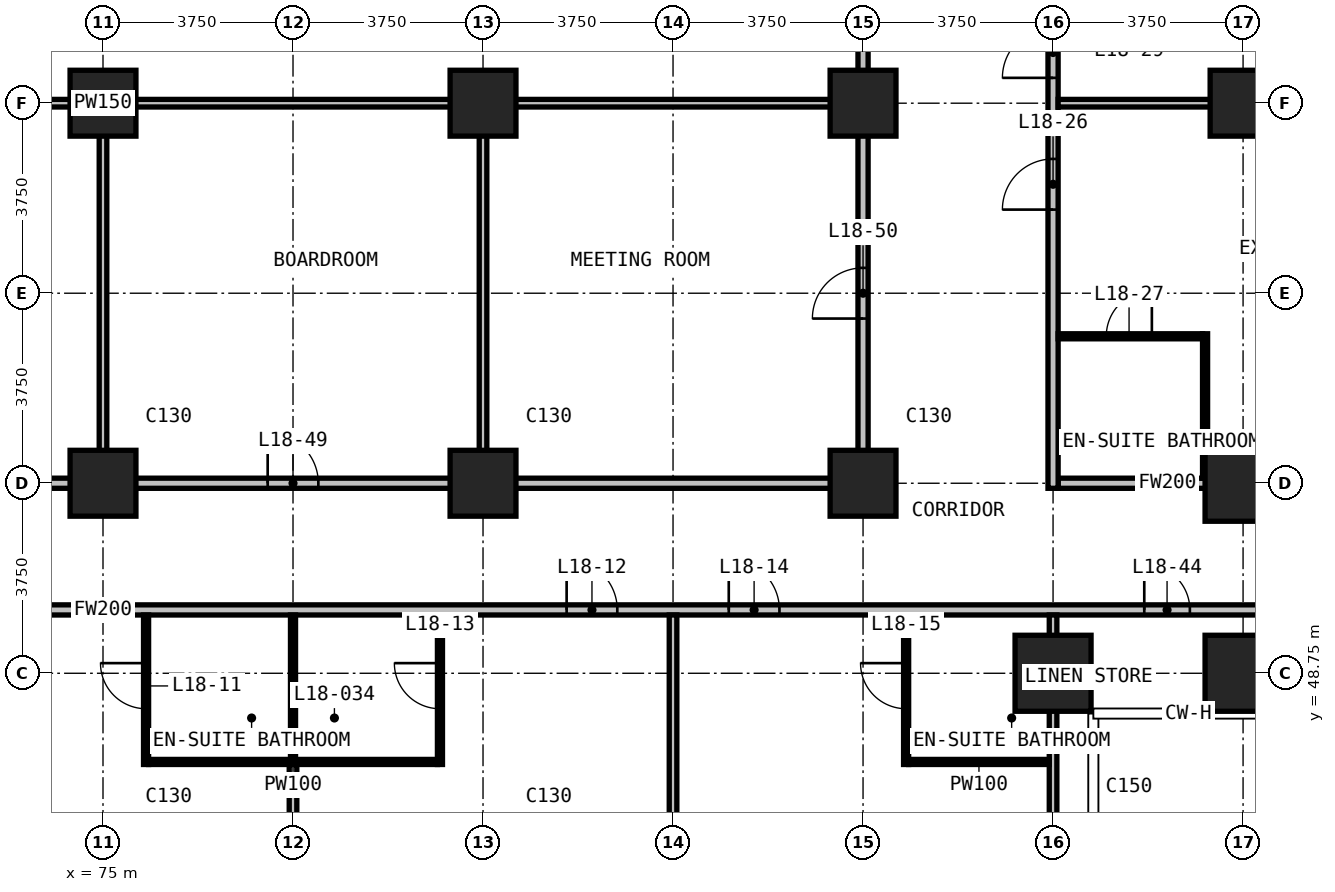
"""IFC4 building model, lengths in metres.
Left out: names, types, materials, properties, quantities, classifications, styles, units other than length and angle.
Written with IfcOpenShell. Run it as: python <this file> out.ifc"""

import sys

from ifc_helpers import new_model, si_unit, direction, frame, frame_2d, origin, origin_2d, place, context, subcontext, project, spatial, rectangle, extrude, element, fill, save


model = new_model("IFC4")
c1 = context("Model", 3, precision=1e-05, world=origin(), true_north=direction((0.0, 1.0)))
c2 = subcontext(c1, "Body", "Model", "MODEL_VIEW")
j1 = project(units=[si_unit("LENGTHUNIT", "METRE"), si_unit("PLANEANGLEUNIT", "RADIAN")], contexts=[c1])
p1 = place(None, origin())
s1 = spatial("IfcSite", under=j1, at=p1, CompositionType="ELEMENT")
p2 = place(p1, origin())
s2 = spatial("IfcBuilding", under=s1, at=p2, CompositionType="ELEMENT")
p3 = place(p2, frame((0.0, 0.0, 79.1)))
s3 = spatial("IfcBuildingStorey", under=s2, at=p3, CompositionType="ELEMENT", Elevation=79.1)
for number, where, z_axis, x_axis in (
    (1, (75.0, 52.5, 0.0), (0.0, 0.0, 1.0), (1.0, 0.0, 0.0)),
    (2, (75.0, 60.0, 0.0), (0.0, 0.0, 1.0), (1.0, 0.0, 0.0)),
    (3, (82.5, 52.5, 0.0), (0.0, 0.0, 1.0), (1.0, 0.0, 0.0)),
    (4, (82.5, 60.0, 0.0), (0.0, 0.0, 1.0), (1.0, 0.0, 0.0)),
    (5, (90.0, 52.5, 0.0), (0.0, 0.0, 1.0), (1.0, 0.0, 0.0)),
    (6, (90.0, 60.0, 0.0), (0.0, 0.0, 1.0), (1.0, 0.0, 0.0)),
):
    element("IfcColumn", number, at=place(p3, frame(where, z_axis=z_axis, x_axis=x_axis)), inside=s3, PredefinedType="COLUMN", context=c2, shape_type="SweptSolid", body=[
        extrude(rectangle(XDim=1.3, YDim=1.3, at=origin_2d()), origin(), (0.0, 0.0, 1.0), 3.3),
    ])
for number, where, z_axis, x_axis in (
    (7, (93.75, 48.75, 0.0), (0.0, 0.0, 1.0), (1.0, 0.0, 0.0)),
    (8, (97.5, 48.75, 0.0), (0.0, 0.0, 1.0), (1.0, 0.0, 0.0)),
    (9, (97.5, 52.5, 0.0), (0.0, 0.0, 1.0), (1.0, 0.0, 0.0)),
):
    element("IfcColumn", number, at=place(p3, frame(where, z_axis=z_axis, x_axis=x_axis)), inside=s3, PredefinedType="COLUMN", context=c2, shape_type="SweptSolid", body=[
        extrude(rectangle(XDim=1.5, YDim=1.5, at=origin_2d()), origin(), (0.0, 0.0, 1.0), 3.3),
    ])
p4 = place(p3, frame((97.5, 60.0, 0.0), z_axis=(0.0, 0.0, 1.0), x_axis=(1.0, 0.0, 0.0)))
e10 = element("IfcColumn", 10, at=p4, inside=s3, PredefinedType="COLUMN", context=c2, shape_type="SweptSolid", body=[
    extrude(rectangle(XDim=1.3, YDim=1.3, at=origin_2d()), origin(), (0.0, 0.0, 1.0), 3.3),
])
p5 = place(p3, frame((51.735, 50.0, 0.0), z_axis=(0.0, 0.0, 1.0), x_axis=(1.0, 0.0, 0.0)))
e11 = element("IfcWall", 11, at=p5, inside=s3, PredefinedType="PARTITIONING", context=c2, shape_type="SweptSolid", body=[
    extrude(rectangle(XDim=46.53, YDim=0.2, at=frame_2d((23.265, 0.0))), origin(), (0.0, 0.0, 1.0), 3.0),
])
p6 = place(p5, frame((5.615, 0.0, 0.0)))
e12 = element("IfcOpeningElement", 12, at=p6, cuts=e11, PredefinedType="OPENING", context=c2, shape_type="SweptSolid", body=[
    extrude(rectangle(XDim=1.0, YDim=2.2, at=frame_2d((0.5, 1.1))), frame((0.0, 0.11, 0.0), z_axis=(0.0, -1.0, 0.0), x_axis=(1.0, 0.0, 0.0)), (0.0, 0.0, 1.0), 0.22),
])
p7 = place(p5, frame((17.415, 0.0, 0.0)))
e13 = element("IfcOpeningElement", 13, at=p7, cuts=e11, PredefinedType="OPENING", context=c2, shape_type="SweptSolid", body=[
    extrude(rectangle(XDim=1.0, YDim=2.2, at=frame_2d((0.5, 1.1))), frame((0.0, 0.11, 0.0), z_axis=(0.0, -1.0, 0.0), x_axis=(1.0, 0.0, 0.0)), (0.0, 0.0, 1.0), 0.22),
])
p8 = place(p5, frame((20.615, 0.0, 0.0)))
e14 = element("IfcOpeningElement", 14, at=p8, cuts=e11, PredefinedType="OPENING", context=c2, shape_type="SweptSolid", body=[
    extrude(rectangle(XDim=1.0, YDim=2.2, at=frame_2d((0.5, 1.1))), frame((0.0, 0.11, 0.0), z_axis=(0.0, -1.0, 0.0), x_axis=(1.0, 0.0, 0.0)), (0.0, 0.0, 1.0), 0.22),
])
p9 = place(p5, frame((32.415, 0.0, 0.0)))
e15 = element("IfcOpeningElement", 15, at=p9, cuts=e11, PredefinedType="OPENING", context=c2, shape_type="SweptSolid", body=[
    extrude(rectangle(XDim=1.0, YDim=2.2, at=frame_2d((0.5, 1.1))), frame((0.0, 0.11, 0.0), z_axis=(0.0, -1.0, 0.0), x_axis=(1.0, 0.0, 0.0)), (0.0, 0.0, 1.0), 0.22),
])
p10 = place(p5, frame((35.615, 0.0, 0.0)))
e16 = element("IfcOpeningElement", 16, at=p10, cuts=e11, PredefinedType="OPENING", context=c2, shape_type="SweptSolid", body=[
    extrude(rectangle(XDim=1.0, YDim=2.2, at=frame_2d((0.5, 1.1))), frame((0.0, 0.11, 0.0), z_axis=(0.0, -1.0, 0.0), x_axis=(1.0, 0.0, 0.0)), (0.0, 0.0, 1.0), 0.22),
])
p11 = place(p5, frame((1.8, 0.0, 0.0)))
e17 = element("IfcOpeningElement", 17, at=p11, cuts=e11, PredefinedType="OPENING", context=c2, shape_type="SweptSolid", body=[
    extrude(rectangle(XDim=0.9, YDim=2.2, at=frame_2d((0.45, 1.1))), frame((0.0, 0.11, 0.0), z_axis=(0.0, -1.0, 0.0), x_axis=(1.0, 0.0, 0.0)), (0.0, 0.0, 1.0), 0.22),
])
p12 = place(p5, frame((43.815, 0.0, 0.0)))
e18 = element("IfcOpeningElement", 18, at=p12, cuts=e11, PredefinedType="OPENING", context=c2, shape_type="SweptSolid", body=[
    extrude(rectangle(XDim=0.9, YDim=2.2, at=frame_2d((0.45, 1.1))), frame((0.0, 0.11, 0.0), z_axis=(0.0, -1.0, 0.0), x_axis=(1.0, 0.0, 0.0)), (0.0, 0.0, 1.0), 0.22),
])
p13 = place(p3, frame((60.1, 52.5, 0.0), z_axis=(0.0, 0.0, 1.0), x_axis=(1.0, 0.0, 0.0)))
e19 = element("IfcWall", 19, at=p13, inside=s3, PredefinedType="PARTITIONING", context=c2, shape_type="SweptSolid", body=[
    extrude(rectangle(XDim=29.8, YDim=0.2, at=frame_2d((14.9, 0.0))), origin(), (0.0, 0.0, 1.0), 3.0),
])
p14 = place(p13, frame((10.65, 0.0, 0.0)))
e20 = element("IfcOpeningElement", 20, at=p14, cuts=e19, PredefinedType="OPENING", context=c2, shape_type="SweptSolid", body=[
    extrude(rectangle(XDim=1.0, YDim=2.2, at=frame_2d((0.5, 1.1))), frame((0.0, 0.11, 0.0), z_axis=(0.0, -1.0, 0.0), x_axis=(1.0, 0.0, 0.0)), (0.0, 0.0, 1.0), 0.22),
])
p15 = place(p13, frame((18.15, 0.0, 0.0)))
e21 = element("IfcOpeningElement", 21, at=p15, cuts=e19, PredefinedType="OPENING", context=c2, shape_type="SweptSolid", body=[
    extrude(rectangle(XDim=1.0, YDim=2.2, at=frame_2d((0.5, 1.1))), frame((0.0, 0.11, 0.0), z_axis=(0.0, -1.0, 0.0), x_axis=(1.0, 0.0, 0.0)), (0.0, 0.0, 1.0), 0.22),
])
p16 = place(p3, frame((93.85, 52.5, 0.0), z_axis=(0.0, 0.0, 1.0), x_axis=(1.0, 0.0, 0.0)))
e22 = element("IfcWall", 22, at=p16, inside=s3, PredefinedType="PARTITIONING", context=c2, shape_type="SweptSolid", body=[
    extrude(rectangle(XDim=4.315, YDim=0.2, at=frame_2d((2.157, 0.0))), origin(), (0.0, 0.0, 1.0), 3.0),
])
p17 = place(p3, frame((90.0, 52.4, 0.0), z_axis=(0.0, 0.0, 1.0), x_axis=(0.0, 1.0, 0.0)))
e23 = element("IfcWall", 23, at=p17, inside=s3, PredefinedType="PARTITIONING", context=c2, shape_type="SweptSolid", body=[
    extrude(rectangle(XDim=18.84, YDim=0.2, at=frame_2d((9.42, 0.0))), origin(), (0.0, 0.0, 1.0), 3.0),
])
p18 = place(p17, frame((3.35, 0.0, 0.0)))
e24 = element("IfcOpeningElement", 24, at=p18, cuts=e23, PredefinedType="OPENING", context=c2, shape_type="SweptSolid", body=[
    extrude(rectangle(XDim=1.0, YDim=2.2, at=frame_2d((0.5, 1.1))), frame((0.0, 0.11, 0.0), z_axis=(0.0, -1.0, 0.0), x_axis=(1.0, 0.0, 0.0)), (0.0, 0.0, 1.0), 0.22),
])
p19 = place(p17, frame((12.3, 0.0, 0.0)))
e25 = element("IfcOpeningElement", 25, at=p19, cuts=e23, PredefinedType="OPENING", context=c2, shape_type="SweptSolid", body=[
    extrude(rectangle(XDim=1.8, YDim=2.2, at=frame_2d((0.9, 1.1))), frame((0.0, 0.11, 0.0), z_axis=(0.0, -1.0, 0.0), x_axis=(1.0, 0.0, 0.0)), (0.0, 0.0, 1.0), 0.22),
])
p20 = place(p3, frame((93.75, 52.4, 0.0), z_axis=(0.0, 0.0, 1.0), x_axis=(0.0, 1.0, 0.0)))
e26 = element("IfcWall", 26, at=p20, inside=s3, PredefinedType="PARTITIONING", context=c2, shape_type="SweptSolid", body=[
    extrude(rectangle(XDim=38.31, YDim=0.2, at=frame_2d((19.155, 0.0))), origin(), (0.0, 0.0, 1.0), 3.0),
])
p21 = place(p20, frame((5.5, 0.0, 0.0)))
e27 = element("IfcOpeningElement", 27, at=p21, cuts=e26, PredefinedType="OPENING", context=c2, shape_type="SweptSolid", body=[
    extrude(rectangle(XDim=1.0, YDim=2.2, at=frame_2d((0.5, 1.1))), frame((0.0, 0.11, 0.0), z_axis=(0.0, -1.0, 0.0), x_axis=(1.0, 0.0, 0.0)), (0.0, 0.0, 1.0), 0.22),
])
p22 = place(p20, frame((8.1, 0.0, 0.0)))
e28 = element("IfcOpeningElement", 28, at=p22, cuts=e26, PredefinedType="OPENING", context=c2, shape_type="SweptSolid", body=[
    extrude(rectangle(XDim=1.0, YDim=2.2, at=frame_2d((0.5, 1.1))), frame((0.0, 0.11, 0.0), z_axis=(0.0, -1.0, 0.0), x_axis=(1.0, 0.0, 0.0)), (0.0, 0.0, 1.0), 0.22),
])
p23 = place(p20, frame((13.6, 0.0, 0.0)))
e29 = element("IfcOpeningElement", 29, at=p23, cuts=e26, PredefinedType="OPENING", context=c2, shape_type="SweptSolid", body=[
    extrude(rectangle(XDim=1.0, YDim=2.2, at=frame_2d((0.5, 1.1))), frame((0.0, 0.11, 0.0), z_axis=(0.0, -1.0, 0.0), x_axis=(1.0, 0.0, 0.0)), (0.0, 0.0, 1.0), 0.22),
])
p24 = place(p20, frame((16.2, 0.0, 0.0)))
e30 = element("IfcOpeningElement", 30, at=p24, cuts=e26, PredefinedType="OPENING", context=c2, shape_type="SweptSolid", body=[
    extrude(rectangle(XDim=1.0, YDim=2.2, at=frame_2d((0.5, 1.1))), frame((0.0, 0.11, 0.0), z_axis=(0.0, -1.0, 0.0), x_axis=(1.0, 0.0, 0.0)), (0.0, 0.0, 1.0), 0.22),
])
p25 = place(p20, frame((24.85, 0.0, 0.0)))
e31 = element("IfcOpeningElement", 31, at=p25, cuts=e26, PredefinedType="OPENING", context=c2, shape_type="SweptSolid", body=[
    extrude(rectangle(XDim=1.0, YDim=2.2, at=frame_2d((0.5, 1.1))), frame((0.0, 0.11, 0.0), z_axis=(0.0, -1.0, 0.0), x_axis=(1.0, 0.0, 0.0)), (0.0, 0.0, 1.0), 0.22),
])
p26 = place(p20, frame((26.85, 0.0, 0.0)))
e32 = element("IfcOpeningElement", 32, at=p26, cuts=e26, PredefinedType="OPENING", context=c2, shape_type="SweptSolid", body=[
    extrude(rectangle(XDim=1.0, YDim=2.2, at=frame_2d((0.5, 1.1))), frame((0.0, 0.11, 0.0), z_axis=(0.0, -1.0, 0.0), x_axis=(1.0, 0.0, 0.0)), (0.0, 0.0, 1.0), 0.22),
])
p27 = place(p20, frame((31.55, 0.0, 0.0)))
e33 = element("IfcOpeningElement", 33, at=p27, cuts=e26, PredefinedType="OPENING", context=c2, shape_type="SweptSolid", body=[
    extrude(rectangle(XDim=0.9, YDim=2.2, at=frame_2d((0.45, 1.1))), frame((0.0, 0.11, 0.0), z_axis=(0.0, -1.0, 0.0), x_axis=(1.0, 0.0, 0.0)), (0.0, 0.0, 1.0), 0.22),
])
p28 = place(p20, frame((35.65, 0.0, 0.0)))
e34 = element("IfcOpeningElement", 34, at=p28, cuts=e26, PredefinedType="OPENING", context=c2, shape_type="SweptSolid", body=[
    extrude(rectangle(XDim=0.9, YDim=2.2, at=frame_2d((0.45, 1.1))), frame((0.0, 0.11, 0.0), z_axis=(0.0, -1.0, 0.0), x_axis=(1.0, 0.0, 0.0)), (0.0, 0.0, 1.0), 0.22),
])
p29 = place(p3, frame((60.1, 60.0, 0.0), z_axis=(0.0, 0.0, 1.0), x_axis=(1.0, 0.0, 0.0)))
e35 = element("IfcWall", 35, at=p29, inside=s3, PredefinedType="PARTITIONING", context=c2, shape_type="SweptSolid", body=[
    extrude(rectangle(XDim=29.8, YDim=0.15, at=frame_2d((14.9, 0.0))), origin(), (0.0, 0.0, 1.0), 3.0),
])
p30 = place(p3, frame((93.85, 60.0, 0.0), z_axis=(0.0, 0.0, 1.0), x_axis=(1.0, 0.0, 0.0)))
e36 = element("IfcWall", 36, at=p30, inside=s3, PredefinedType="PARTITIONING", context=c2, shape_type="SweptSolid", body=[
    extrude(rectangle(XDim=8.165, YDim=0.15, at=frame_2d((4.083, 0.0))), origin(), (0.0, 0.0, 1.0), 3.0),
])
p31 = place(p3, frame((75.0, 52.6, 0.0), z_axis=(0.0, 0.0, 1.0), x_axis=(0.0, 1.0, 0.0)))
e37 = element("IfcWall", 37, at=p31, inside=s3, PredefinedType="PARTITIONING", context=c2, shape_type="SweptSolid", body=[
    extrude(rectangle(XDim=7.325, YDim=0.15, at=frame_2d((3.663, 0.0))), origin(), (0.0, 0.0, 1.0), 3.0),
])
p32 = place(p3, frame((78.75, 40.54, 0.0), z_axis=(0.0, 0.0, 1.0), x_axis=(0.0, 1.0, 0.0)))
e38 = element("IfcWall", 38, at=p32, inside=s3, PredefinedType="PARTITIONING", context=c2, shape_type="SweptSolid", body=[
    extrude(rectangle(XDim=6.41, YDim=0.15, at=frame_2d((3.205, 0.0))), origin(), (0.0, 0.0, 1.0), 3.0),
])
p33 = place(p3, frame((82.5, 52.6, 0.0), z_axis=(0.0, 0.0, 1.0), x_axis=(0.0, 1.0, 0.0)))
e39 = element("IfcWall", 39, at=p33, inside=s3, PredefinedType="PARTITIONING", context=c2, shape_type="SweptSolid", body=[
    extrude(rectangle(XDim=7.325, YDim=0.15, at=frame_2d((3.663, 0.0))), origin(), (0.0, 0.0, 1.0), 3.0),
])
p34 = place(p3, frame((86.25, 40.54, 0.0), z_axis=(0.0, 0.0, 1.0), x_axis=(0.0, 1.0, 0.0)))
e40 = element("IfcWall", 40, at=p34, inside=s3, PredefinedType="PARTITIONING", context=c2, shape_type="SweptSolid", body=[
    extrude(rectangle(XDim=9.36, YDim=0.15, at=frame_2d((4.68, 0.0))), origin(), (0.0, 0.0, 1.0), 3.0),
])
p35 = place(p3, frame((93.75, 44.235, 0.0), z_axis=(0.0, 0.0, 1.0), x_axis=(0.0, 1.0, 0.0)))
e41 = element("IfcWall", 41, at=p35, inside=s3, PredefinedType="PARTITIONING", context=c2, shape_type="SweptSolid", body=[
    extrude(rectangle(XDim=5.665, YDim=0.15, at=frame_2d((2.833, 0.0))), origin(), (0.0, 0.0, 1.0), 3.0),
])
p36 = place(p3, frame((75.9, 47.0, 0.0), z_axis=(0.0, 0.0, 1.0), x_axis=(1.0, 0.0, 0.0)))
e42 = element("IfcWall", 42, at=p36, inside=s3, PredefinedType="PARTITIONING", context=c2, shape_type="SweptSolid", body=[
    extrude(rectangle(XDim=5.7, YDim=0.1, at=frame_2d((2.85, 0.0))), origin(), (0.0, 0.0, 1.0), 3.0),
])
p37 = place(p3, frame((90.9, 47.0, 0.0), z_axis=(0.0, 0.0, 1.0), x_axis=(1.0, 0.0, 0.0)))
e43 = element("IfcWall", 43, at=p37, inside=s3, PredefinedType="PARTITIONING", context=c2, shape_type="SweptSolid", body=[
    extrude(rectangle(XDim=2.775, YDim=0.1, at=frame_2d((1.388, 0.0))), origin(), (0.0, 0.0, 1.0), 3.0),
])
p38 = place(p3, frame((93.85, 55.4, 0.0), z_axis=(0.0, 0.0, 1.0), x_axis=(1.0, 0.0, 0.0)))
e44 = element("IfcWall", 44, at=p38, inside=s3, PredefinedType="PARTITIONING", context=c2, shape_type="SweptSolid", body=[
    extrude(rectangle(XDim=2.85, YDim=0.1, at=frame_2d((1.425, 0.0))), origin(), (0.0, 0.0, 1.0), 3.0),
])
p39 = place(p38, frame((0.95, 0.0, 0.0)))
e45 = element("IfcOpeningElement", 45, at=p39, cuts=e44, PredefinedType="OPENING", context=c2, shape_type="SweptSolid", body=[
    extrude(rectangle(XDim=0.9, YDim=2.2, at=frame_2d((0.45, 1.1))), frame((0.0, 0.06, 0.0), z_axis=(0.0, -1.0, 0.0), x_axis=(1.0, 0.0, 0.0)), (0.0, 0.0, 1.0), 0.12),
])
p40 = place(p3, frame((75.85, 46.95, 0.0), z_axis=(0.0, 0.0, 1.0), x_axis=(0.0, 1.0, 0.0)))
e46 = element("IfcWall", 46, at=p40, inside=s3, PredefinedType="PARTITIONING", context=c2, shape_type="SweptSolid", body=[
    extrude(rectangle(XDim=2.95, YDim=0.1, at=frame_2d((1.475, 0.0))), origin(), (0.0, 0.0, 1.0), 3.0),
])
p41 = place(p40, frame((1.1, 0.0, 0.0)))
e47 = element("IfcOpeningElement", 47, at=p41, cuts=e46, PredefinedType="OPENING", context=c2, shape_type="SweptSolid", body=[
    extrude(rectangle(XDim=0.9, YDim=2.2, at=frame_2d((0.45, 1.1))), frame((0.0, 0.06, 0.0), z_axis=(0.0, -1.0, 0.0), x_axis=(1.0, 0.0, 0.0)), (0.0, 0.0, 1.0), 0.12),
])
p42 = place(p3, frame((78.75, 47.05, 0.0), z_axis=(0.0, 0.0, 1.0), x_axis=(0.0, 1.0, 0.0)))
e48 = element("IfcWall", 48, at=p42, inside=s3, PredefinedType="PARTITIONING", context=c2, shape_type="SweptSolid", body=[
    extrude(rectangle(XDim=2.85, YDim=0.1, at=frame_2d((1.425, 0.0))), origin(), (0.0, 0.0, 1.0), 3.0),
])
p43 = place(p3, frame((81.65, 46.95, 0.0), z_axis=(0.0, 0.0, 1.0), x_axis=(0.0, 1.0, 0.0)))
e49 = element("IfcWall", 49, at=p43, inside=s3, PredefinedType="PARTITIONING", context=c2, shape_type="SweptSolid", body=[
    extrude(rectangle(XDim=2.95, YDim=0.1, at=frame_2d((1.475, 0.0))), origin(), (0.0, 0.0, 1.0), 3.0),
])
p44 = place(p43, frame((1.1, 0.0, 0.0)))
e50 = element("IfcOpeningElement", 50, at=p44, cuts=e49, PredefinedType="OPENING", context=c2, shape_type="SweptSolid", body=[
    extrude(rectangle(XDim=0.9, YDim=2.2, at=frame_2d((0.45, 1.1))), frame((0.0, 0.06, 0.0), z_axis=(0.0, -1.0, 0.0), x_axis=(1.0, 0.0, 0.0)), (0.0, 0.0, 1.0), 0.12),
])
p45 = place(p3, frame((90.85, 46.95, 0.0), z_axis=(0.0, 0.0, 1.0), x_axis=(0.0, 1.0, 0.0)))
e51 = element("IfcWall", 51, at=p45, inside=s3, PredefinedType="PARTITIONING", context=c2, shape_type="SweptSolid", body=[
    extrude(rectangle(XDim=2.95, YDim=0.1, at=frame_2d((1.475, 0.0))), origin(), (0.0, 0.0, 1.0), 3.0),
])
p46 = place(p45, frame((1.1, 0.0, 0.0)))
e52 = element("IfcOpeningElement", 52, at=p46, cuts=e51, PredefinedType="OPENING", context=c2, shape_type="SweptSolid", body=[
    extrude(rectangle(XDim=0.9, YDim=2.2, at=frame_2d((0.45, 1.1))), frame((0.0, 0.06, 0.0), z_axis=(0.0, -1.0, 0.0), x_axis=(1.0, 0.0, 0.0)), (0.0, 0.0, 1.0), 0.12),
])
p47 = place(p3, frame((96.75, 52.6, 0.0), z_axis=(0.0, 0.0, 1.0), x_axis=(0.0, 1.0, 0.0)))
e53 = element("IfcWall", 53, at=p47, inside=s3, PredefinedType="PARTITIONING", context=c2, shape_type="SweptSolid", body=[
    extrude(rectangle(XDim=2.85, YDim=0.1, at=frame_2d((1.425, 0.0))), origin(), (0.0, 0.0, 1.0), 3.0),
])
p48 = place(p41, origin())
e54 = element("IfcDoor", 54, at=p48, inside=s3, OperationType="SINGLE_SWING_RIGHT", PredefinedType="DOOR", context=c2, shape_type="SweptSolid", body=[
    extrude(rectangle(XDim=0.9, YDim=2.2, at=frame_2d((0.45, 1.1))), frame((0.0, 0.025, 0.0), z_axis=(0.0, -1.0, 0.0), x_axis=(1.0, 0.0, 0.0)), (0.0, 0.0, 1.0), 0.05),
])
fill(e47, e54)
p49 = place(p9, origin())
e55 = element("IfcDoor", 55, at=p49, inside=s3, OperationType="SINGLE_SWING_RIGHT", PredefinedType="DOOR", context=c2, shape_type="SweptSolid", body=[
    extrude(rectangle(XDim=1.0, YDim=2.2, at=frame_2d((0.5, 1.1))), frame((0.0, 0.025, 0.0), z_axis=(0.0, -1.0, 0.0), x_axis=(1.0, 0.0, 0.0)), (0.0, 0.0, 1.0), 0.05),
])
fill(e15, e55)
p50 = place(p44, origin())
e56 = element("IfcDoor", 56, at=p50, inside=s3, OperationType="SINGLE_SWING_RIGHT", PredefinedType="DOOR", context=c2, shape_type="SweptSolid", body=[
    extrude(rectangle(XDim=0.9, YDim=2.2, at=frame_2d((0.45, 1.1))), frame((0.0, 0.025, 0.0), z_axis=(0.0, -1.0, 0.0), x_axis=(1.0, 0.0, 0.0)), (0.0, 0.0, 1.0), 0.05),
])
fill(e50, e56)
p51 = place(p10, origin())
e57 = element("IfcDoor", 57, at=p51, inside=s3, OperationType="SINGLE_SWING_RIGHT", PredefinedType="DOOR", context=c2, shape_type="SweptSolid", body=[
    extrude(rectangle(XDim=1.0, YDim=2.2, at=frame_2d((0.5, 1.1))), frame((0.0, 0.025, 0.0), z_axis=(0.0, -1.0, 0.0), x_axis=(1.0, 0.0, 0.0)), (0.0, 0.0, 1.0), 0.05),
])
fill(e16, e57)
p52 = place(p46, origin())
e58 = element("IfcDoor", 58, at=p52, inside=s3, OperationType="SINGLE_SWING_RIGHT", PredefinedType="DOOR", context=c2, shape_type="SweptSolid", body=[
    extrude(rectangle(XDim=0.9, YDim=2.2, at=frame_2d((0.45, 1.1))), frame((0.0, 0.025, 0.0), z_axis=(0.0, -1.0, 0.0), x_axis=(1.0, 0.0, 0.0)), (0.0, 0.0, 1.0), 0.05),
])
fill(e52, e58)
p53 = place(p21, origin())
e59 = element("IfcDoor", 59, at=p53, inside=s3, OperationType="SINGLE_SWING_LEFT", PredefinedType="DOOR", context=c2, shape_type="SweptSolid", body=[
    extrude(rectangle(XDim=1.0, YDim=2.2, at=frame_2d((0.5, 1.1))), frame((0.0, 0.025, 0.0), z_axis=(0.0, -1.0, 0.0), x_axis=(1.0, 0.0, 0.0)), (0.0, 0.0, 1.0), 0.05),
])
fill(e27, e59)
p54 = place(p39, origin())
e60 = element("IfcDoor", 60, at=p54, inside=s3, OperationType="SINGLE_SWING_RIGHT", PredefinedType="DOOR", context=c2, shape_type="SweptSolid", body=[
    extrude(rectangle(XDim=0.9, YDim=2.2, at=frame_2d((0.45, 1.1))), frame((0.0, 0.025, 0.0), z_axis=(0.0, -1.0, 0.0), x_axis=(1.0, 0.0, 0.0)), (0.0, 0.0, 1.0), 0.05),
])
fill(e45, e60)
p55 = place(p22, origin())
e61 = element("IfcDoor", 61, at=p55, inside=s3, OperationType="SINGLE_SWING_RIGHT", PredefinedType="DOOR", context=c2, shape_type="SweptSolid", body=[
    extrude(rectangle(XDim=1.0, YDim=2.2, at=frame_2d((0.5, 1.1))), frame((0.0, 0.025, 0.0), z_axis=(0.0, -1.0, 0.0), x_axis=(1.0, 0.0, 0.0)), (0.0, 0.0, 1.0), 0.05),
])
fill(e28, e61)
p56 = place(p12, origin())
e62 = element("IfcDoor", 62, at=p56, inside=s3, OperationType="SINGLE_SWING_LEFT", PredefinedType="DOOR", context=c2, shape_type="SweptSolid", body=[
    extrude(rectangle(XDim=0.9, YDim=2.2, at=frame_2d((0.45, 1.1))), frame((0.0, 0.025, 0.0), z_axis=(0.0, -1.0, 0.0), x_axis=(1.0, 0.0, 0.0)), (0.0, 0.0, 1.0), 0.05),
])
fill(e18, e62)
p57 = place(p15, origin())
e63 = element("IfcDoor", 63, at=p57, inside=s3, OperationType="SINGLE_SWING_LEFT", PredefinedType="DOOR", context=c2, shape_type="SweptSolid", body=[
    extrude(rectangle(XDim=1.0, YDim=2.2, at=frame_2d((0.5, 1.1))), frame((0.0, 0.025, 0.0), z_axis=(0.0, -1.0, 0.0), x_axis=(1.0, 0.0, 0.0)), (0.0, 0.0, 1.0), 0.05),
])
fill(e21, e63)
p58 = place(p18, origin())
e64 = element("IfcDoor", 64, at=p58, inside=s3, OperationType="SINGLE_SWING_RIGHT", PredefinedType="DOOR", context=c2, shape_type="SweptSolid", body=[
    extrude(rectangle(XDim=1.0, YDim=2.2, at=frame_2d((0.5, 1.1))), frame((0.0, 0.025, 0.0), z_axis=(0.0, -1.0, 0.0), x_axis=(1.0, 0.0, 0.0)), (0.0, 0.0, 1.0), 0.05),
])
fill(e24, e64)
save(model, sys.argv[1])
